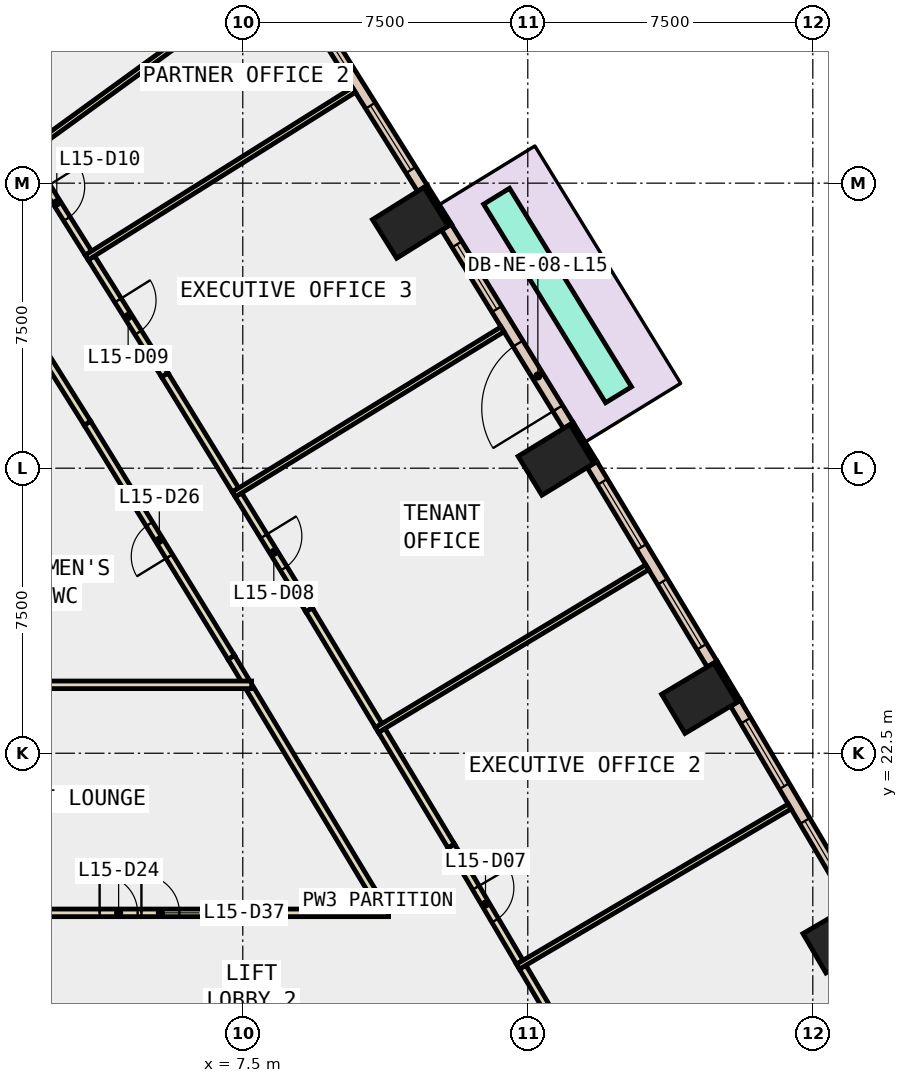
"""IFC4 building model, lengths in metres.
Left out: names, types, materials, properties, quantities, classifications, styles, units other than length and angle.
Written with IfcOpenShell. Run it as: python <this file> out.ifc"""

import sys

from ifc_helpers import new_model, si_unit, direction, frame, frame_2d, origin, origin_2d, place, context, subcontext, project, spatial, rectangle, extrude, element, fill, save


model = new_model("IFC4")
c1 = context("Model", 3, precision=1e-05, world=origin(), true_north=direction((0.0, 1.0)))
c2 = subcontext(c1, "Body", "Model", "MODEL_VIEW")
j1 = project(units=[si_unit("LENGTHUNIT", "METRE"), si_unit("PLANEANGLEUNIT", "RADIAN")], contexts=[c1])
p1 = place(None, origin())
s1 = spatial("IfcSite", under=j1, at=p1, CompositionType="ELEMENT")
p2 = place(p1, origin())
s2 = spatial("IfcBuilding", under=s1, at=p2, CompositionType="ELEMENT")
p3 = place(p2, frame((0.0, 0.0, 72.8)))
s3 = spatial("IfcBuildingStorey", under=s2, at=p3, CompositionType="ELEMENT", Elevation=72.8)
for number, where, z_axis, x_axis in (
    (1, (23.234, 17.64, -0.4), (0.0, 0.0, 1.0), (-0.504, 0.864, 0.0)),
    (2, (19.516, 23.947, -0.4), (0.0, 0.0, 1.0), (-0.513, 0.858, 0.0)),
    (3, (15.741, 30.219, -0.4), (0.0, 0.0, 1.0), (-0.522, 0.853, 0.0)),
    (4, (11.909, 36.457, -0.4), (0.0, 0.0, 1.0), (-0.53, 0.848, 0.0)),
):
    element("IfcColumn", number, at=place(p3, frame(where, z_axis=z_axis, x_axis=x_axis)), inside=s3, PredefinedType="COLUMN", context=c2, shape_type="SweptSolid", body=[
        extrude(rectangle(XDim=1.2, YDim=1.6, at=origin_2d()), origin(), (0.0, 0.0, 1.0), 4.2),
    ])
p4 = place(p3, frame((20.554, 23.868, 0.0), z_axis=(0.0, 0.0, 1.0), x_axis=(-0.513238760752, 0.858245870635, 0.0)))
e5 = element("IfcWall", 5, at=p4, inside=s3, PredefinedType="STANDARD", context=c2, shape_type="SweptSolid", body=[
    extrude(rectangle(XDim=1.2, YDim=0.1, at=frame_2d((0.6, 0.0))), origin(), (0.0, 0.0, 1.0), 3.8),
])
p5 = place(p3, frame((16.779, 30.15, 0.0), z_axis=(0.0, 0.0, 1.0), x_axis=(-0.521507599072, 0.853246637327, 0.0)))
e6 = element("IfcWall", 6, at=p5, inside=s3, PredefinedType="STANDARD", context=c2, shape_type="SweptSolid", body=[
    extrude(rectangle(XDim=1.2, YDim=0.1, at=frame_2d((0.6, 0.0))), origin(), (0.0, 0.0, 1.0), 3.8),
])
p6 = place(p3, frame((12.948, 36.399, 0.0), z_axis=(0.0, 0.0, 1.0), x_axis=(-0.53018187123, 0.847883944546, 0.0)))
e7 = element("IfcWall", 7, at=p6, inside=s3, PredefinedType="STANDARD", context=c2, shape_type="SweptSolid", body=[
    extrude(rectangle(XDim=1.199, YDim=0.1, at=frame_2d((0.6, 0.0))), origin(), (0.0, 0.0, 1.0), 3.8),
])
p7 = place(p3, frame((23.577, 18.534, 0.0), z_axis=(0.0, 0.0, 1.0), x_axis=(-0.507716058644, 0.861524465001, 0.0)))
e8 = element("IfcWall", 8, at=p7, inside=s3, PredefinedType="STANDARD", context=c2, shape_type="SweptSolid", body=[
    extrude(rectangle(XDim=6.131, YDim=0.3, at=frame_2d((3.065, 0.0))), origin(), (0.0, 0.0, 1.0), 3.8),
])
p8 = place(p7, frame((0.533, 0.0, 0.9)))
e9 = element("IfcOpeningElement", 9, at=p8, cuts=e8, PredefinedType="OPENING", context=c2, shape_type="SweptSolid", body=[
    extrude(rectangle(XDim=2.0, YDim=2.6, at=frame_2d((1.0, 1.3))), frame((0.0, 0.16, 0.0), z_axis=(0.0, -1.0, 0.0), x_axis=(1.0, 0.0, 0.0)), (0.0, 0.0, 1.0), 0.32),
])
p9 = place(p7, frame((3.598, 0.0, 0.9)))
e10 = element("IfcOpeningElement", 10, at=p9, cuts=e8, PredefinedType="OPENING", context=c2, shape_type="SweptSolid", body=[
    extrude(rectangle(XDim=2.0, YDim=2.6, at=frame_2d((1.0, 1.3))), frame((0.0, 0.16, 0.0), z_axis=(0.0, -1.0, 0.0), x_axis=(1.0, 0.0, 0.0)), (0.0, 0.0, 1.0), 0.32),
])
p10 = place(p3, frame((19.851, 24.845, 0.0), z_axis=(0.0, 0.0, 1.0), x_axis=(-0.515690089348, 0.856775193238, 0.0)))
e11 = element("IfcWall", 11, at=p10, inside=s3, PredefinedType="STANDARD", context=c2, shape_type="SweptSolid", body=[
    extrude(rectangle(XDim=6.13, YDim=0.3, at=frame_2d((3.065, 0.0))), origin(), (0.0, 0.0, 1.0), 3.8),
])
p11 = place(p10, frame((0.532, 0.0, 0.9)))
e12 = element("IfcOpeningElement", 12, at=p11, cuts=e11, PredefinedType="OPENING", context=c2, shape_type="SweptSolid", body=[
    extrude(rectangle(XDim=2.0, YDim=2.6, at=frame_2d((1.0, 1.3))), frame((0.0, 0.16, 0.0), z_axis=(0.0, -1.0, 0.0), x_axis=(1.0, 0.0, 0.0)), (0.0, 0.0, 1.0), 0.32),
])
p12 = place(p10, frame((3.597, 0.0, 0.9)))
e13 = element("IfcOpeningElement", 13, at=p12, cuts=e11, PredefinedType="OPENING", context=c2, shape_type="SweptSolid", body=[
    extrude(rectangle(XDim=2.0, YDim=2.6, at=frame_2d((1.0, 1.3))), frame((0.0, 0.16, 0.0), z_axis=(0.0, -1.0, 0.0), x_axis=(1.0, 0.0, 0.0)), (0.0, 0.0, 1.0), 0.32),
])
p13 = place(p3, frame((16.067, 31.12, 0.0), z_axis=(0.0, 0.0, 1.0), x_axis=(-0.523421823151, 0.852073702827, 0.0)))
e14 = element("IfcWall", 14, at=p13, inside=s3, PredefinedType="STANDARD", context=c2, shape_type="SweptSolid", body=[
    extrude(rectangle(XDim=6.131, YDim=0.3, at=frame_2d((3.065, 0.0))), origin(), (0.0, 0.0, 1.0), 3.8),
])
p14 = place(p13, frame((0.533, 0.0, 0.0)))
e15 = element("IfcOpeningElement", 15, at=p14, cuts=e14, PredefinedType="OPENING", context=c2, shape_type="SweptSolid", body=[
    extrude(rectangle(XDim=2.0, YDim=2.4, at=frame_2d((1.0, 1.2))), frame((0.0, 0.16, 0.0), z_axis=(0.0, -1.0, 0.0), x_axis=(1.0, 0.0, 0.0)), (0.0, 0.0, 1.0), 0.32),
])
p15 = place(p13, frame((3.598, 0.0, 0.9)))
e16 = element("IfcOpeningElement", 16, at=p15, cuts=e14, PredefinedType="OPENING", context=c2, shape_type="SweptSolid", body=[
    extrude(rectangle(XDim=2.0, YDim=2.6, at=frame_2d((1.0, 1.3))), frame((0.0, 0.16, 0.0), z_axis=(0.0, -1.0, 0.0), x_axis=(1.0, 0.0, 0.0)), (0.0, 0.0, 1.0), 0.32),
])
p16 = place(p3, frame((12.227, 37.362, 0.0), z_axis=(0.0, 0.0, 1.0), x_axis=(-0.531357111884, 0.847147932565, 0.0)))
e17 = element("IfcWall", 17, at=p16, inside=s3, PredefinedType="STANDARD", context=c2, shape_type="SweptSolid", body=[
    extrude(rectangle(XDim=6.282, YDim=0.3, at=frame_2d((3.141, 0.0))), origin(), (0.0, 0.0, 1.0), 3.8),
])
p17 = place(p16, frame((0.571, 0.0, 0.9)))
e18 = element("IfcOpeningElement", 18, at=p17, cuts=e17, PredefinedType="OPENING", context=c2, shape_type="SweptSolid", body=[
    extrude(rectangle(XDim=2.0, YDim=2.6, at=frame_2d((1.0, 1.3))), frame((0.0, 0.16, 0.0), z_axis=(0.0, -1.0, 0.0), x_axis=(1.0, 0.0, 0.0)), (0.0, 0.0, 1.0), 0.32),
])
p18 = place(p16, frame((3.712, 0.0, 0.9)))
e19 = element("IfcOpeningElement", 19, at=p18, cuts=e17, PredefinedType="OPENING", context=c2, shape_type="SweptSolid", body=[
    extrude(rectangle(XDim=2.0, YDim=2.6, at=frame_2d((1.0, 1.3))), frame((0.0, 0.16, 0.0), z_axis=(0.0, -1.0, 0.0), x_axis=(1.0, 0.0, 0.0)), (0.0, 0.0, 1.0), 0.32),
])
p19 = place(p3, frame((17.388, 31.932, 0.0), z_axis=(0.0, 0.0, 1.0), x_axis=(-0.523404063218, 0.852084612352, 0.0)))
e20 = element("IfcWall", 20, at=p19, inside=s3, PredefinedType="STANDARD", context=c2, shape_type="SweptSolid", body=[
    extrude(rectangle(XDim=6.131, YDim=0.8, at=frame_2d((3.065, 0.0))), origin(), (0.0, 0.0, 1.0), 0.8),
])
p20 = place(p3, frame((11.186, 18.386, 0.0), z_axis=(0.0, 0.0, 1.0), x_axis=(-0.507247363226, 0.861800506208, 0.0)))
e21 = element("IfcWall", 21, at=p20, inside=s3, PredefinedType="PARTITIONING", context=c2, shape_type="SweptSolid", body=[
    extrude(rectangle(XDim=0.516, YDim=0.2, at=frame_2d((0.258, 0.0))), origin(), (0.0, 0.0, 1.0), 3.8),
])
p21 = place(p3, frame((10.924, 18.831, 0.0), z_axis=(0.0, 0.0, 1.0), x_axis=(-0.515797941416, 0.856710268195, 0.0)))
e22 = element("IfcWall", 22, at=p21, inside=s3, PredefinedType="PARTITIONING", context=c2, shape_type="SweptSolid", body=[
    extrude(rectangle(XDim=6.283, YDim=0.2, at=frame_2d((3.142, 0.0))), origin(), (0.0, 0.0, 1.0), 3.8),
])
p22 = place(p3, frame((7.58, 24.386, 0.0), z_axis=(0.0, 0.0, 1.0), x_axis=(-0.515748848873, 0.856739823334, 0.0)))
e23 = element("IfcWall", 23, at=p22, inside=s3, PredefinedType="PARTITIONING", context=c2, shape_type="SweptSolid", body=[
    extrude(rectangle(XDim=0.745, YDim=0.2, at=frame_2d((0.372, 0.0))), origin(), (0.0, 0.0, 1.0), 3.8),
])
p23 = place(p3, frame((7.196, 25.024, 0.0), z_axis=(0.0, 0.0, 1.0), x_axis=(-0.523464329994, 0.852047589765, 0.0)))
e24 = element("IfcWall", 24, at=p23, inside=s3, PredefinedType="PARTITIONING", context=c2, shape_type="SweptSolid", body=[
    extrude(rectangle(XDim=7.231, YDim=0.2, at=frame_2d((3.615, 0.0))), origin(), (0.0, 0.0, 1.0), 3.8),
])
p24 = place(p23, frame((3.115, 0.0, 0.0)))
e25 = element("IfcOpeningElement", 25, at=p24, cuts=e24, PredefinedType="OPENING", context=c2, shape_type="SweptSolid", body=[
    extrude(rectangle(XDim=1.0, YDim=2.1, at=frame_2d((0.5, 1.05))), frame((0.0, 0.11, 0.0), z_axis=(0.0, -1.0, 0.0), x_axis=(1.0, 0.0, 0.0)), (0.0, 0.0, 1.0), 0.22),
])
p25 = place(p3, frame((3.411, 31.185, 0.0), z_axis=(0.0, 0.0, 1.0), x_axis=(-0.531358798686, 0.84714687455, 0.0)))
e26 = element("IfcWall", 26, at=p25, inside=s3, PredefinedType="PARTITIONING", context=c2, shape_type="SweptSolid", body=[
    extrude(rectangle(XDim=2.597, YDim=0.2, at=frame_2d((1.298, 0.0))), origin(), (0.0, 0.0, 1.0), 3.8),
])
p26 = place(p3, frame((14.865, 16.871, 0.0), z_axis=(0.0, 0.0, 1.0), x_axis=(0.507839876831, -0.861451484125, 0.0)))
e27 = element("IfcWall", 27, at=p26, inside=s3, PredefinedType="PARTITIONING", context=c2, shape_type="SweptSolid", body=[
    extrude(rectangle(XDim=3.552, YDim=0.2, at=frame_2d((1.776, 0.0))), origin(), (0.0, 0.0, 1.0), 3.8),
])
p27 = place(p3, frame((11.156, 23.1, 0.0), z_axis=(0.0, 0.0, 1.0), x_axis=(0.515628270719, -0.856812398623, 0.0)))
e28 = element("IfcWall", 28, at=p27, inside=s3, PredefinedType="PARTITIONING", context=c2, shape_type="SweptSolid", body=[
    extrude(rectangle(XDim=3.549, YDim=0.2, at=frame_2d((1.775, 0.0))), origin(), (0.0, 0.0, 1.0), 3.8),
])
p28 = place(p3, frame((12.986, 20.059, 0.0), z_axis=(0.0, 0.0, 1.0), x_axis=(0.507876424268, -0.861429937762, 0.0)))
e29 = element("IfcWall", 29, at=p28, inside=s3, PredefinedType="PARTITIONING", context=c2, shape_type="SweptSolid", body=[
    extrude(rectangle(XDim=3.55, YDim=0.2, at=frame_2d((1.775, 0.0))), origin(), (0.0, 0.0, 1.0), 3.8),
])
p29 = place(p28, frame((1.275, 0.0, 0.0)))
e30 = element("IfcOpeningElement", 30, at=p29, cuts=e29, PredefinedType="OPENING", context=c2, shape_type="SweptSolid", body=[
    extrude(rectangle(XDim=1.0, YDim=2.1, at=frame_2d((0.5, 1.05))), frame((0.0, 0.11, 0.0), z_axis=(0.0, -1.0, 0.0), x_axis=(1.0, 0.0, 0.0)), (0.0, 0.0, 1.0), 0.22),
])
p30 = place(p3, frame((7.387, 29.298, 0.0), z_axis=(0.0, 0.0, 1.0), x_axis=(0.523341833043, -0.852122834917, 0.0)))
e31 = element("IfcWall", 31, at=p30, inside=s3, PredefinedType="PARTITIONING", context=c2, shape_type="SweptSolid", body=[
    extrude(rectangle(XDim=3.552, YDim=0.2, at=frame_2d((1.776, 0.0))), origin(), (0.0, 0.0, 1.0), 3.8),
])
p31 = place(p30, frame((1.276, 0.0, 0.0)))
e32 = element("IfcOpeningElement", 32, at=p31, cuts=e31, PredefinedType="OPENING", context=c2, shape_type="SweptSolid", body=[
    extrude(rectangle(XDim=1.0, YDim=2.1, at=frame_2d((0.5, 1.05))), frame((0.0, 0.11, 0.0), z_axis=(0.0, -1.0, 0.0), x_axis=(1.0, 0.0, 0.0)), (0.0, 0.0, 1.0), 0.22),
])
p32 = place(p3, frame((9.246, 26.271, 0.0), z_axis=(0.0, 0.0, 1.0), x_axis=(0.515738557296, -0.856746018677, 0.0)))
e33 = element("IfcWall", 33, at=p32, inside=s3, PredefinedType="PARTITIONING", context=c2, shape_type="SweptSolid", body=[
    extrude(rectangle(XDim=3.552, YDim=0.2, at=frame_2d((1.776, 0.0))), origin(), (0.0, 0.0, 1.0), 3.8),
])
p33 = place(p3, frame((3.517, 35.533, 0.0), z_axis=(0.0, 0.0, 1.0), x_axis=(0.531301282969, -0.847182947607, 0.0)))
e34 = element("IfcWall", 34, at=p33, inside=s3, PredefinedType="PARTITIONING", context=c2, shape_type="SweptSolid", body=[
    extrude(rectangle(XDim=3.638, YDim=0.2, at=frame_2d((1.819, 0.0))), origin(), (0.0, 0.0, 1.0), 3.8),
])
p34 = place(p33, frame((1.319, 0.0, 0.0)))
e35 = element("IfcOpeningElement", 35, at=p34, cuts=e34, PredefinedType="OPENING", context=c2, shape_type="SweptSolid", body=[
    extrude(rectangle(XDim=1.0, YDim=2.1, at=frame_2d((0.5, 1.05))), frame((0.0, 0.11, 0.0), z_axis=(0.0, -1.0, 0.0), x_axis=(1.0, 0.0, 0.0)), (0.0, 0.0, 1.0), 0.22),
])
p35 = place(p3, frame((5.45, 32.451, 0.0), z_axis=(0.0, 0.0, 1.0), x_axis=(0.523617783711, -0.851953294836, 0.0)))
e36 = element("IfcWall", 36, at=p35, inside=s3, PredefinedType="PARTITIONING", context=c2, shape_type="SweptSolid", body=[
    extrude(rectangle(XDim=3.551, YDim=0.2, at=frame_2d((1.775, 0.0))), origin(), (0.0, 0.0, 1.0), 3.8),
])
p36 = place(p3, frame((1.775, 38.31, 0.0), z_axis=(0.0, 0.0, 1.0), x_axis=(0.531324164807, -0.847168597088, 0.0)))
e37 = element("IfcWall", 37, at=p36, inside=s3, PredefinedType="PARTITIONING", context=c2, shape_type="SweptSolid", body=[
    extrude(rectangle(XDim=3.128, YDim=0.2, at=frame_2d((1.564, 0.0))), origin(), (0.0, 0.0, 1.0), 3.8),
])
p37 = place(p36, frame((1.064, 0.0, 0.0)))
e38 = element("IfcOpeningElement", 38, at=p37, cuts=e37, PredefinedType="OPENING", context=c2, shape_type="SweptSolid", body=[
    extrude(rectangle(XDim=1.0, YDim=2.1, at=frame_2d((0.5, 1.05))), frame((0.0, 0.11, 0.0), z_axis=(0.0, -1.0, 0.0), x_axis=(1.0, 0.0, 0.0)), (0.0, 0.0, 1.0), 0.22),
])
p38 = place(p3, frame((-0.1, 24.3, 0.0), z_axis=(0.0, 0.0, 1.0), x_axis=(1.0, 0.0, 0.0)))
e39 = element("IfcWall", 39, at=p38, inside=s3, PredefinedType="PARTITIONING", context=c2, shape_type="SweptSolid", body=[
    extrude(rectangle(XDim=7.832, YDim=0.2, at=frame_2d((3.916, 0.0))), origin(), (0.0, 0.0, 1.0), 3.8),
])
p39 = place(p3, frame((14.741, 16.885, 0.0), z_axis=(0.0, 0.0, 1.0), x_axis=(0.861505144806, 0.507748840936, 0.0)))
e40 = element("IfcWall", 40, at=p39, inside=s3, PredefinedType="PARTITIONING", context=c2, shape_type="SweptSolid", body=[
    extrude(rectangle(XDim=8.3, YDim=0.15, at=frame_2d((4.15, 0.0))), origin(), (0.0, 0.0, 1.0), 3.8),
])
p40 = place(p3, frame((11.031, 23.113, 0.0), z_axis=(0.0, 0.0, 1.0), x_axis=(0.856780947164, 0.515680529568, 0.0)))
e41 = element("IfcWall", 41, at=p40, inside=s3, PredefinedType="PARTITIONING", context=c2, shape_type="SweptSolid", body=[
    extrude(rectangle(XDim=8.3, YDim=0.15, at=frame_2d((4.15, 0.0))), origin(), (0.0, 0.0, 1.0), 3.8),
])
p41 = place(p3, frame((7.263, 29.31, 0.0), z_axis=(0.0, 0.0, 1.0), x_axis=(0.85208929269, 0.523396443706, 0.0)))
e42 = element("IfcWall", 42, at=p41, inside=s3, PredefinedType="PARTITIONING", context=c2, shape_type="SweptSolid", body=[
    extrude(rectangle(XDim=8.3, YDim=0.15, at=frame_2d((4.15, 0.0))), origin(), (0.0, 0.0, 1.0), 3.8),
])
p42 = place(p3, frame((3.393, 35.543, 0.0), z_axis=(0.0, 0.0, 1.0), x_axis=(0.847089858839, 0.531449688166, 0.0)))
e43 = element("IfcWall", 43, at=p42, inside=s3, PredefinedType="PARTITIONING", context=c2, shape_type="SweptSolid", body=[
    extrude(rectangle(XDim=8.3, YDim=0.15, at=frame_2d((4.15, 0.0))), origin(), (0.0, 0.0, 1.0), 3.8),
])
p43 = place(p3, frame((1.708, 38.23, 0.0), z_axis=(0.0, 0.0, 1.0), x_axis=(0.809349578957, 0.58732721633, 0.0)))
e44 = element("IfcWall", 44, at=p43, inside=s3, PredefinedType="PARTITIONING", context=c2, shape_type="SweptSolid", body=[
    extrude(rectangle(XDim=6.896, YDim=0.15, at=frame_2d((3.448, 0.0))), origin(), (0.0, 0.0, 1.0), 3.8),
])
p44 = place(p3, frame((0.4, 18.3, 0.0), z_axis=(0.0, 0.0, 1.0), x_axis=(1.0, 0.0, 0.0)))
e45 = element("IfcWall", 45, at=p44, inside=s3, PredefinedType="PARTITIONING", context=c2, shape_type="SweptSolid", body=[
    extrude(rectangle(XDim=10.937, YDim=0.2, at=frame_2d((5.469, 0.0))), origin(), (0.0, 0.0, 1.0), 3.8),
])
p45 = place(p44, frame((3.333, 0.0, 0.0)))
e46 = element("IfcOpeningElement", 46, at=p45, cuts=e45, PredefinedType="OPENING", context=c2, shape_type="SweptSolid", body=[
    extrude(rectangle(XDim=1.0, YDim=2.1, at=frame_2d((0.5, 1.05))), frame((0.0, 0.11, 0.0), z_axis=(0.0, -1.0, 0.0), x_axis=(1.0, 0.0, 0.0)), (0.0, 0.0, 1.0), 0.22),
])
p46 = place(p44, frame((4.433, 0.0, 0.0)))
e47 = element("IfcOpeningElement", 47, at=p46, cuts=e45, PredefinedType="OPENING", context=c2, shape_type="SweptSolid", body=[
    extrude(rectangle(XDim=1.0, YDim=2.1, at=frame_2d((0.5, 1.05))), frame((0.0, 0.11, 0.0), z_axis=(0.0, -1.0, 0.0), x_axis=(1.0, 0.0, 0.0)), (0.0, 0.0, 1.0), 0.22),
])
p47 = place(p8, origin())
e48 = element("IfcWindow", 48, at=p47, inside=s3, PartitioningType="SINGLE_PANEL", PredefinedType="WINDOW", context=c2, shape_type="SweptSolid", body=[
    extrude(rectangle(XDim=2.0, YDim=2.6, at=frame_2d((1.0, 1.3))), frame((0.0, 0.03, 0.0), z_axis=(0.0, -1.0, 0.0), x_axis=(1.0, 0.0, 0.0)), (0.0, 0.0, 1.0), 0.06),
])
fill(e9, e48)
p48 = place(p9, origin())
e49 = element("IfcWindow", 49, at=p48, inside=s3, PartitioningType="SINGLE_PANEL", PredefinedType="WINDOW", context=c2, shape_type="SweptSolid", body=[
    extrude(rectangle(XDim=2.0, YDim=2.6, at=frame_2d((1.0, 1.3))), frame((0.0, 0.03, 0.0), z_axis=(0.0, -1.0, 0.0), x_axis=(1.0, 0.0, 0.0)), (0.0, 0.0, 1.0), 0.06),
])
fill(e10, e49)
p49 = place(p11, origin())
e50 = element("IfcWindow", 50, at=p49, inside=s3, PartitioningType="SINGLE_PANEL", PredefinedType="WINDOW", context=c2, shape_type="SweptSolid", body=[
    extrude(rectangle(XDim=2.0, YDim=2.6, at=frame_2d((1.0, 1.3))), frame((0.0, 0.03, 0.0), z_axis=(0.0, -1.0, 0.0), x_axis=(1.0, 0.0, 0.0)), (0.0, 0.0, 1.0), 0.06),
])
fill(e12, e50)
p50 = place(p12, origin())
e51 = element("IfcWindow", 51, at=p50, inside=s3, PartitioningType="SINGLE_PANEL", PredefinedType="WINDOW", context=c2, shape_type="SweptSolid", body=[
    extrude(rectangle(XDim=2.0, YDim=2.6, at=frame_2d((1.0, 1.3))), frame((0.0, 0.03, 0.0), z_axis=(0.0, -1.0, 0.0), x_axis=(1.0, 0.0, 0.0)), (0.0, 0.0, 1.0), 0.06),
])
fill(e13, e51)
p51 = place(p14, origin())
e52 = element("IfcDoor", 52, at=p51, inside=s3, OperationType="SLIDING_TO_LEFT", PredefinedType="DOOR", context=c2, shape_type="SweptSolid", body=[
    extrude(rectangle(XDim=2.0, YDim=2.4, at=frame_2d((1.0, 1.2))), frame((0.0, 0.025, 0.0), z_axis=(0.0, -1.0, 0.0), x_axis=(1.0, 0.0, 0.0)), (0.0, 0.0, 1.0), 0.05),
])
fill(e15, e52)
p52 = place(p15, origin())
e53 = element("IfcWindow", 53, at=p52, inside=s3, PartitioningType="SINGLE_PANEL", PredefinedType="WINDOW", context=c2, shape_type="SweptSolid", body=[
    extrude(rectangle(XDim=2.0, YDim=2.6, at=frame_2d((1.0, 1.3))), frame((0.0, 0.03, 0.0), z_axis=(0.0, -1.0, 0.0), x_axis=(1.0, 0.0, 0.0)), (0.0, 0.0, 1.0), 0.06),
])
fill(e16, e53)
p53 = place(p17, origin())
e54 = element("IfcWindow", 54, at=p53, inside=s3, PartitioningType="SINGLE_PANEL", PredefinedType="WINDOW", context=c2, shape_type="SweptSolid", body=[
    extrude(rectangle(XDim=2.0, YDim=2.6, at=frame_2d((1.0, 1.3))), frame((0.0, 0.03, 0.0), z_axis=(0.0, -1.0, 0.0), x_axis=(1.0, 0.0, 0.0)), (0.0, 0.0, 1.0), 0.06),
])
fill(e18, e54)
p54 = place(p18, origin())
e55 = element("IfcWindow", 55, at=p54, inside=s3, PartitioningType="SINGLE_PANEL", PredefinedType="WINDOW", context=c2, shape_type="SweptSolid", body=[
    extrude(rectangle(XDim=2.0, YDim=2.6, at=frame_2d((1.0, 1.3))), frame((0.0, 0.03, 0.0), z_axis=(0.0, -1.0, 0.0), x_axis=(1.0, 0.0, 0.0)), (0.0, 0.0, 1.0), 0.06),
])
fill(e19, e55)
p55 = place(p29, origin())
e56 = element("IfcDoor", 56, at=p55, inside=s3, OperationType="SINGLE_SWING_RIGHT", PredefinedType="DOOR", context=c2, shape_type="SweptSolid", body=[
    extrude(rectangle(XDim=1.0, YDim=2.1, at=frame_2d((0.5, 1.05))), frame((0.0, 0.025, 0.0), z_axis=(0.0, -1.0, 0.0), x_axis=(1.0, 0.0, 0.0)), (0.0, 0.0, 1.0), 0.05),
])
fill(e30, e56)
p56 = place(p31, origin())
e57 = element("IfcDoor", 57, at=p56, inside=s3, OperationType="SINGLE_SWING_RIGHT", PredefinedType="DOOR", context=c2, shape_type="SweptSolid", body=[
    extrude(rectangle(XDim=1.0, YDim=2.1, at=frame_2d((0.5, 1.05))), frame((0.0, 0.025, 0.0), z_axis=(0.0, -1.0, 0.0), x_axis=(1.0, 0.0, 0.0)), (0.0, 0.0, 1.0), 0.05),
])
fill(e32, e57)
p57 = place(p34, origin())
e58 = element("IfcDoor", 58, at=p57, inside=s3, OperationType="SINGLE_SWING_LEFT", PredefinedType="DOOR", context=c2, shape_type="SweptSolid", body=[
    extrude(rectangle(XDim=1.0, YDim=2.1, at=frame_2d((0.5, 1.05))), frame((0.0, 0.025, 0.0), z_axis=(0.0, -1.0, 0.0), x_axis=(1.0, 0.0, 0.0)), (0.0, 0.0, 1.0), 0.05),
])
fill(e35, e58)
p58 = place(p37, origin())
e59 = element("IfcDoor", 59, at=p58, inside=s3, OperationType="SINGLE_SWING_LEFT", PredefinedType="DOOR", context=c2, shape_type="SweptSolid", body=[
    extrude(rectangle(XDim=1.0, YDim=2.1, at=frame_2d((0.5, 1.05))), frame((0.0, 0.025, 0.0), z_axis=(0.0, -1.0, 0.0), x_axis=(1.0, 0.0, 0.0)), (0.0, 0.0, 1.0), 0.05),
])
fill(e38, e59)
p59 = place(p45, origin())
e60 = element("IfcDoor", 60, at=p59, inside=s3, OperationType="SINGLE_SWING_LEFT", PredefinedType="DOOR", context=c2, shape_type="SweptSolid", body=[
    extrude(rectangle(XDim=1.0, YDim=2.1, at=frame_2d((0.5, 1.05))), frame((0.0, 0.025, 0.0), z_axis=(0.0, -1.0, 0.0), x_axis=(1.0, 0.0, 0.0)), (0.0, 0.0, 1.0), 0.05),
])
fill(e46, e60)
p60 = place(p24, origin())
e61 = element("IfcDoor", 61, at=p60, inside=s3, OperationType="SINGLE_SWING_LEFT", PredefinedType="DOOR", context=c2, shape_type="SweptSolid", body=[
    extrude(rectangle(XDim=1.0, YDim=2.1, at=frame_2d((0.5, 1.05))), frame((0.0, 0.025, 0.0), z_axis=(0.0, -1.0, 0.0), x_axis=(1.0, 0.0, 0.0)), (0.0, 0.0, 1.0), 0.05),
])
fill(e25, e61)
p61 = place(p46, origin())
e62 = element("IfcDoor", 62, at=p61, inside=s3, OperationType="SINGLE_SWING_RIGHT", PredefinedType="DOOR", context=c2, shape_type="SweptSolid", body=[
    extrude(rectangle(XDim=1.0, YDim=2.1, at=frame_2d((0.5, 1.05))), frame((0.0, 0.025, 0.0), z_axis=(0.0, -1.0, 0.0), x_axis=(1.0, 0.0, 0.0)), (0.0, 0.0, 1.0), 0.05),
])
fill(e47, e62)
save(model, sys.argv[1])
